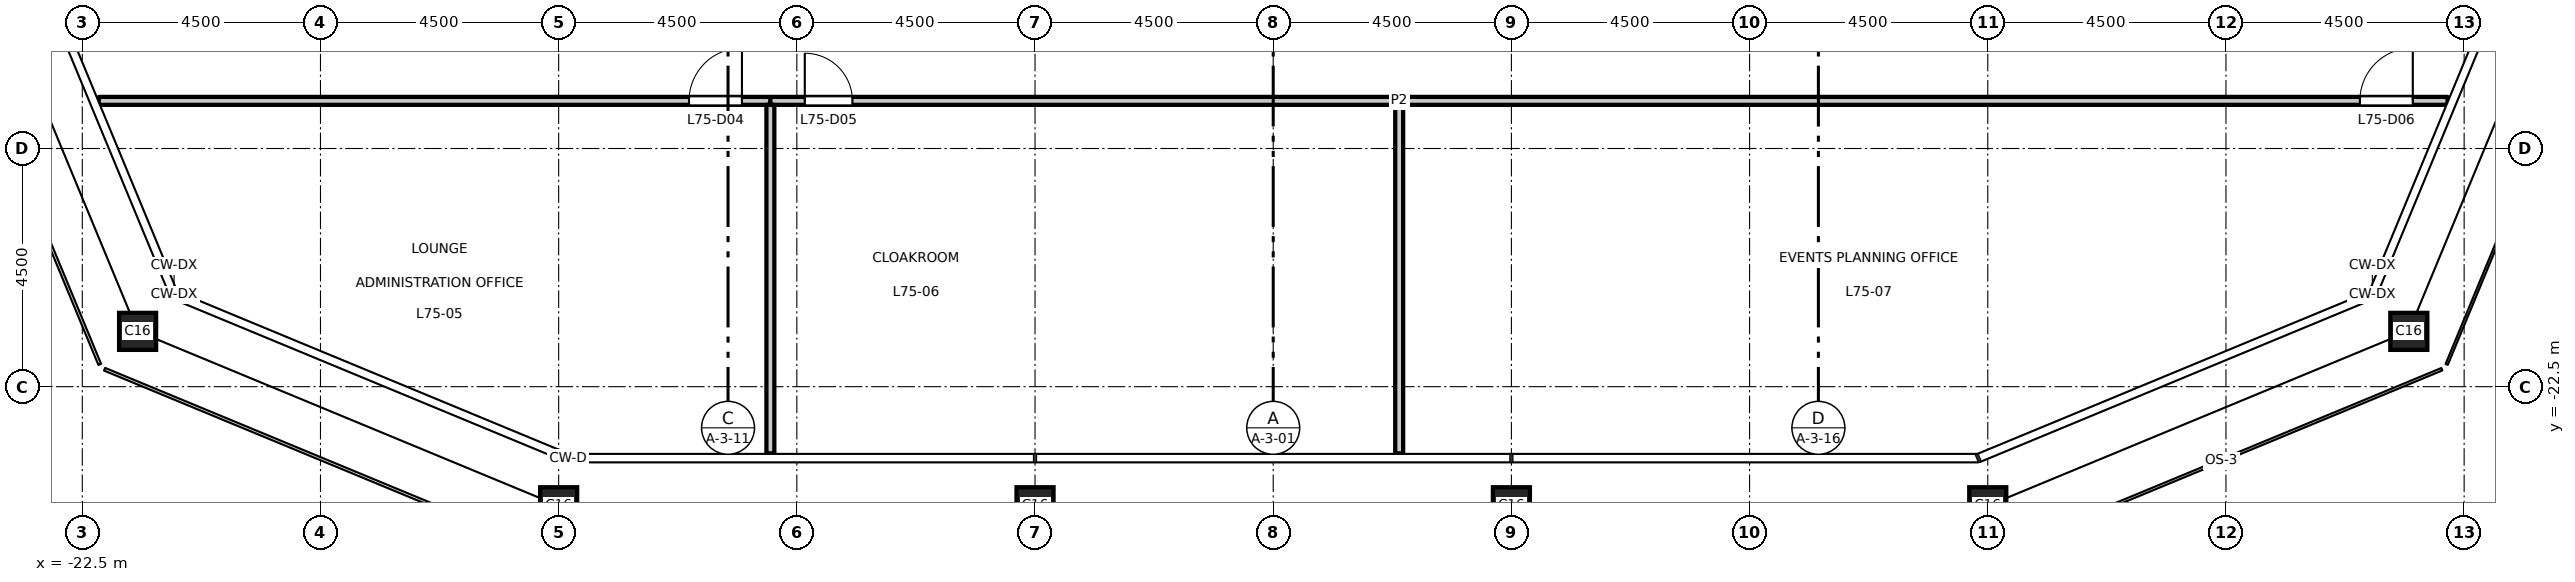
"""IFC4 building model, lengths in metres.
Left out: names, types, materials, properties, quantities, classifications, styles, units other than length and angle.
Written with IfcOpenShell. Run it as: python <this file> out.ifc"""

import sys

from ifc_helpers import new_model, si_unit, direction, frame, frame_2d, origin, origin_2d, place, context, subcontext, project, spatial, rectangle, hollow_rectangle, extrude, element, fill, save


model = new_model("IFC4")
c1 = context("Model", 3, precision=1e-05, world=origin(), true_north=direction((0.0, 1.0)))
c2 = subcontext(c1, "Body", "Model", "MODEL_VIEW")
j1 = project(units=[si_unit("LENGTHUNIT", "METRE"), si_unit("PLANEANGLEUNIT", "RADIAN")], contexts=[c1])
p1 = place(None, origin())
s1 = spatial("IfcSite", under=j1, at=p1, CompositionType="ELEMENT")
p2 = place(p1, origin())
s2 = spatial("IfcBuilding", under=s1, at=p2, CompositionType="ELEMENT")
p3 = place(p2, frame((0.0, 0.0, 348.2)))
s3 = spatial("IfcBuildingStorey", under=s2, at=p3, CompositionType="ELEMENT", Elevation=348.2)
for number, where, z_axis, x_axis in (
    (1, (-13.5, -24.75, 0.0), (0.0, 0.0, 1.0), (1.0, 0.0, 0.0)),
    (2, (-4.5, -24.75, 0.0), (0.0, 0.0, 1.0), (1.0, 0.0, 0.0)),
    (3, (4.5, -24.75, 0.0), (0.0, 0.0, 1.0), (1.0, 0.0, 0.0)),
    (4, (13.5, -24.75, 0.0), (0.0, 0.0, 1.0), (1.0, 0.0, 0.0)),
    (5, (21.455, -21.455, 0.0), (0.0, 0.0, 1.0), (1.0, 0.0, 0.0)),
    (6, (-21.455, -21.455, 0.0), (0.0, 0.0, 1.0), (1.0, 0.0, 0.0)),
):
    element("IfcColumn", number, at=place(p3, frame(where, z_axis=z_axis, x_axis=x_axis)), inside=s3, PredefinedType="COLUMN", context=c2, shape_type="SweptSolid", body=[
        extrude(hollow_rectangle(XDim=0.7, YDim=0.7, WallThickness=0.036, at=origin_2d()), origin(), (0.0, 0.0, 1.0), 5.0),
    ])
p4 = place(p3, frame((-22.187, -17.1, 0.0), z_axis=(0.0, 0.0, 1.0), x_axis=(1.0, 0.0, 0.0)))
e7 = element("IfcWall", 7, at=p4, inside=s3, PredefinedType="PARTITIONING", context=c2, shape_type="SweptSolid", body=[
    extrude(rectangle(XDim=12.687, YDim=0.15, at=frame_2d((6.344, 0.0))), origin(), (0.0, 0.0, 1.0), 4.8),
])
p5 = place(p4, frame((11.15, 0.0, 0.0)))
e8 = element("IfcOpeningElement", 8, at=p5, cuts=e7, PredefinedType="OPENING", context=c2, shape_type="SweptSolid", body=[
    extrude(rectangle(XDim=1.0, YDim=2.1, at=frame_2d((0.5, 1.05))), frame((0.0, 0.085, 0.0), z_axis=(0.0, -1.0, 0.0), x_axis=(1.0, 0.0, 0.0)), (0.0, 0.0, 1.0), 0.17),
])
p6 = place(p3, frame((2.38, -17.1, 0.0), z_axis=(0.0, 0.0, 1.0), x_axis=(1.0, 0.0, 0.0)))
e9 = element("IfcWall", 9, at=p6, inside=s3, PredefinedType="PARTITIONING", context=c2, shape_type="SweptSolid", body=[
    extrude(rectangle(XDim=19.807, YDim=0.15, at=frame_2d((9.904, 0.0))), origin(), (0.0, 0.0, 1.0), 4.8),
])
p7 = place(p6, frame((18.15, 0.0, 0.0)))
e10 = element("IfcOpeningElement", 10, at=p7, cuts=e9, PredefinedType="OPENING", context=c2, shape_type="SweptSolid", body=[
    extrude(rectangle(XDim=1.0, YDim=2.1, at=frame_2d((0.5, 1.05))), frame((0.0, 0.085, 0.0), z_axis=(0.0, -1.0, 0.0), x_axis=(1.0, 0.0, 0.0)), (0.0, 0.0, 1.0), 0.17),
])
p8 = place(p3, frame((-9.5, -17.1, 0.0), z_axis=(0.0, 0.0, 1.0), x_axis=(1.0, 0.0, 0.0)))
e11 = element("IfcWall", 11, at=p8, inside=s3, PredefinedType="PARTITIONING", context=c2, shape_type="SweptSolid", body=[
    extrude(rectangle(XDim=11.88, YDim=0.15, at=frame_2d((5.94, 0.0))), origin(), (0.0, 0.0, 1.0), 4.8),
])
p9 = place(p8, frame((0.65, 0.0, 0.0)))
e12 = element("IfcOpeningElement", 12, at=p9, cuts=e11, PredefinedType="OPENING", context=c2, shape_type="SweptSolid", body=[
    extrude(rectangle(XDim=0.9, YDim=2.1, at=frame_2d((0.45, 1.05))), frame((0.0, 0.085, 0.0), z_axis=(0.0, -1.0, 0.0), x_axis=(1.0, 0.0, 0.0)), (0.0, 0.0, 1.0), 0.17),
])
for number, where, z_axis, x_axis in (
    (13, (-9.5, -23.76, 0.0), (0.0, 0.0, 1.0), (0.0, 1.0, 0.0)),
    (14, (2.38, -23.76, 0.0), (0.0, 0.0, 1.0), (0.0, 1.0, 0.0)),
):
    element("IfcWall", number, at=place(p3, frame(where, z_axis=z_axis, x_axis=x_axis)), inside=s3, PredefinedType="PARTITIONING", context=c2, shape_type="SweptSolid", body=[
        extrude(rectangle(XDim=6.585, YDim=0.15, at=frame_2d((3.292, 0.0))), origin(), (0.0, 0.0, 1.0), 4.8),
    ])
p10 = place(p5, origin())
e15 = element("IfcDoor", 15, at=p10, inside=s3, OperationType="SINGLE_SWING_RIGHT", PredefinedType="DOOR", context=c2, shape_type="SweptSolid", body=[
    extrude(rectangle(XDim=1.0, YDim=2.1, at=frame_2d((0.5, 1.05))), frame((0.0, 0.025, 0.0), z_axis=(0.0, -1.0, 0.0), x_axis=(1.0, 0.0, 0.0)), (0.0, 0.0, 1.0), 0.05),
])
fill(e8, e15)
p11 = place(p9, origin())
e16 = element("IfcDoor", 16, at=p11, inside=s3, OperationType="SINGLE_SWING_LEFT", PredefinedType="DOOR", context=c2, shape_type="SweptSolid", body=[
    extrude(rectangle(XDim=0.9, YDim=2.1, at=frame_2d((0.45, 1.05))), frame((0.0, 0.025, 0.0), z_axis=(0.0, -1.0, 0.0), x_axis=(1.0, 0.0, 0.0)), (0.0, 0.0, 1.0), 0.05),
])
fill(e12, e16)
p12 = place(p7, origin())
e17 = element("IfcDoor", 17, at=p12, inside=s3, OperationType="SINGLE_SWING_RIGHT", PredefinedType="DOOR", context=c2, shape_type="SweptSolid", body=[
    extrude(rectangle(XDim=1.0, YDim=2.1, at=frame_2d((0.5, 1.05))), frame((0.0, 0.025, 0.0), z_axis=(0.0, -1.0, 0.0), x_axis=(1.0, 0.0, 0.0)), (0.0, 0.0, 1.0), 0.05),
])
fill(e10, e17)
save(model, sys.argv[1])
